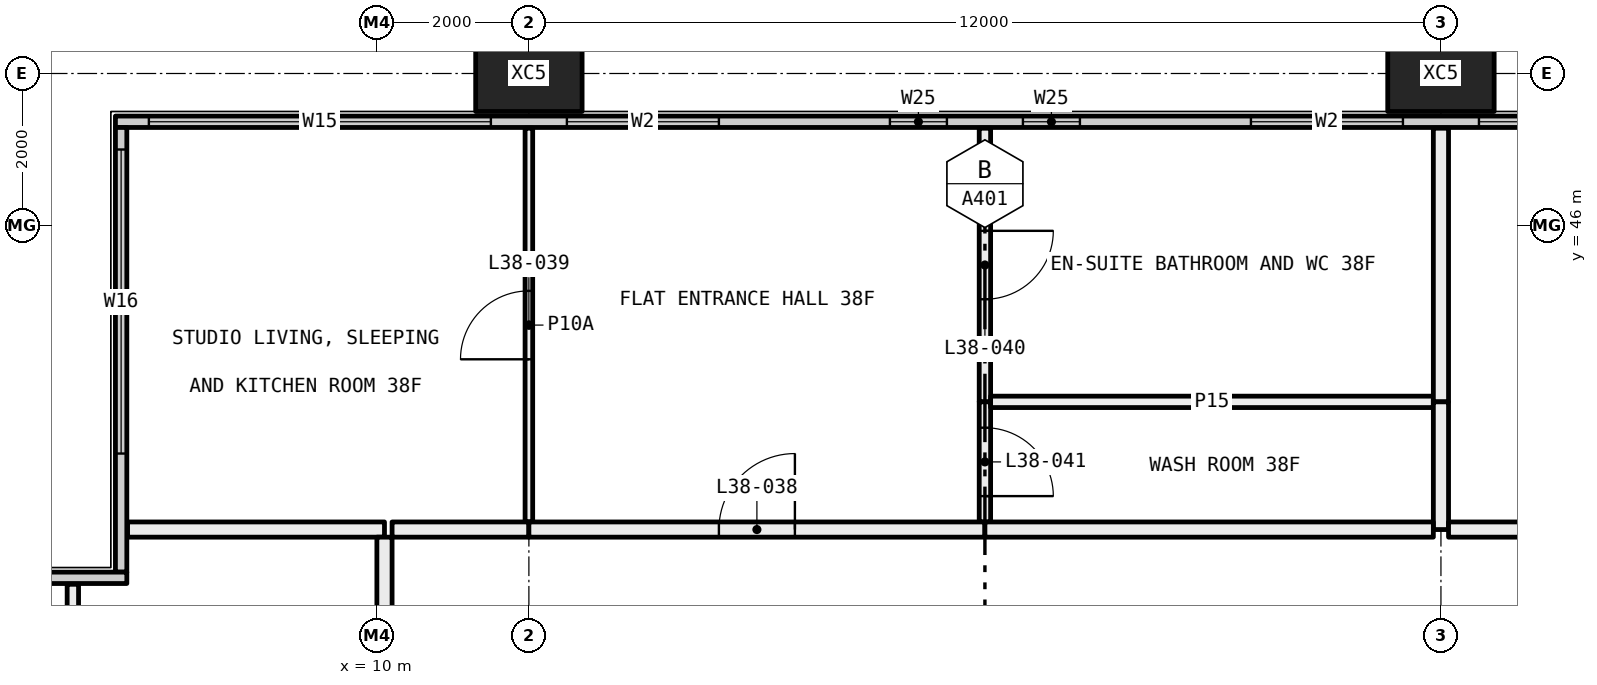
"""IFC4 building model, lengths in metres.
Left out: names, types, materials, properties, quantities, classifications, styles, units other than length and angle.
Written with IfcOpenShell. Run it as: python <this file> out.ifc"""

import sys

from ifc_helpers import new_model, si_unit, direction, frame, frame_2d, origin, origin_2d, place, context, subcontext, project, spatial, rectangle, hollow_rectangle, extrude, element, fill, save


model = new_model("IFC4")
c1 = context("Model", 3, precision=1e-05, world=origin(), true_north=direction((0.0, 1.0)))
c2 = subcontext(c1, "Body", "Model", "MODEL_VIEW")
j1 = project(units=[si_unit("LENGTHUNIT", "METRE"), si_unit("PLANEANGLEUNIT", "RADIAN")], contexts=[c1])
p1 = place(None, origin())
s1 = spatial("IfcSite", under=j1, at=p1, CompositionType="ELEMENT")
p2 = place(p1, origin())
s2 = spatial("IfcBuilding", under=s1, at=p2, CompositionType="ELEMENT")
p3 = place(p2, frame((0.0, 0.0, 144.9)))
s3 = spatial("IfcBuildingStorey", under=s2, at=p3, CompositionType="ELEMENT", Elevation=144.9)
for number, where, z_axis, x_axis in (
    (1, (12.0, 48.0, -0.4), (0.0, 0.0, 1.0), (1.0, 0.0, 0.0)),
    (2, (24.0, 48.0, -0.4), (0.0, 0.0, 1.0), (1.0, 0.0, 0.0)),
):
    element("IfcColumn", number, at=place(p3, frame(where, z_axis=z_axis, x_axis=x_axis)), inside=s3, PredefinedType="COLUMN", context=c2, shape_type="SweptSolid", body=[
        extrude(hollow_rectangle(XDim=1.4, YDim=1.0, WallThickness=0.055, at=origin_2d()), origin(), (0.0, 0.0, 1.0), 3.45),
    ])
p4 = place(p3, frame((6.56, 47.365, 0.0), z_axis=(0.0, 0.0, 1.0), x_axis=(1.0, 0.0, 0.0)))
e3 = element("IfcWall", 3, at=p4, inside=s3, PredefinedType="ELEMENTEDWALL", context=c2, shape_type="SweptSolid", body=[
    extrude(rectangle(XDim=58.88, YDim=0.15, at=frame_2d((29.44, 0.0))), origin(), (0.0, 0.0, 1.0), 3.05),
])
p5 = place(p4, frame((0.44, 0.0, 0.45)))
e4 = element("IfcOpeningElement", 4, at=p5, cuts=e3, PredefinedType="OPENING", context=c2, shape_type="SweptSolid", body=[
    extrude(rectangle(XDim=4.5, YDim=2.55, at=frame_2d((2.25, 1.275))), frame((0.0, 0.085, 0.0), z_axis=(0.0, -1.0, 0.0), x_axis=(1.0, 0.0, 0.0)), (0.0, 0.0, 1.0), 0.17),
])
p6 = place(p4, frame((5.94, 0.0, 0.45)))
e5 = element("IfcOpeningElement", 5, at=p6, cuts=e3, PredefinedType="OPENING", context=c2, shape_type="SweptSolid", body=[
    extrude(rectangle(XDim=2.0, YDim=2.55, at=frame_2d((1.0, 1.275))), frame((0.0, 0.085, 0.0), z_axis=(0.0, -1.0, 0.0), x_axis=(1.0, 0.0, 0.0)), (0.0, 0.0, 1.0), 0.17),
])
p7 = place(p4, frame((10.19, 0.0, 0.45)))
e6 = element("IfcOpeningElement", 6, at=p7, cuts=e3, PredefinedType="OPENING", context=c2, shape_type="SweptSolid", body=[
    extrude(rectangle(XDim=0.75, YDim=2.55, at=frame_2d((0.375, 1.275))), frame((0.0, 0.085, 0.0), z_axis=(0.0, -1.0, 0.0), x_axis=(1.0, 0.0, 0.0)), (0.0, 0.0, 1.0), 0.17),
])
p8 = place(p4, frame((11.94, 0.0, 0.45)))
e7 = element("IfcOpeningElement", 7, at=p8, cuts=e3, PredefinedType="OPENING", context=c2, shape_type="SweptSolid", body=[
    extrude(rectangle(XDim=0.75, YDim=2.55, at=frame_2d((0.375, 1.275))), frame((0.0, 0.085, 0.0), z_axis=(0.0, -1.0, 0.0), x_axis=(1.0, 0.0, 0.0)), (0.0, 0.0, 1.0), 0.17),
])
p9 = place(p4, frame((14.94, 0.0, 0.45)))
e8 = element("IfcOpeningElement", 8, at=p9, cuts=e3, PredefinedType="OPENING", context=c2, shape_type="SweptSolid", body=[
    extrude(rectangle(XDim=2.0, YDim=2.55, at=frame_2d((1.0, 1.275))), frame((0.0, 0.085, 0.0), z_axis=(0.0, -1.0, 0.0), x_axis=(1.0, 0.0, 0.0)), (0.0, 0.0, 1.0), 0.17),
])
p10 = place(p4, frame((17.94, 0.0, 0.45)))
e9 = element("IfcOpeningElement", 9, at=p10, cuts=e3, PredefinedType="OPENING", context=c2, shape_type="SweptSolid", body=[
    extrude(rectangle(XDim=2.0, YDim=2.55, at=frame_2d((1.0, 1.275))), frame((0.0, 0.085, 0.0), z_axis=(0.0, -1.0, 0.0), x_axis=(1.0, 0.0, 0.0)), (0.0, 0.0, 1.0), 0.17),
])
p11 = place(p4, frame((22.19, 0.0, 0.45)))
e10 = element("IfcOpeningElement", 10, at=p11, cuts=e3, PredefinedType="OPENING", context=c2, shape_type="SweptSolid", body=[
    extrude(rectangle(XDim=0.75, YDim=2.55, at=frame_2d((0.375, 1.275))), frame((0.0, 0.085, 0.0), z_axis=(0.0, -1.0, 0.0), x_axis=(1.0, 0.0, 0.0)), (0.0, 0.0, 1.0), 0.17),
])
p12 = place(p4, frame((23.94, 0.0, 0.45)))
e11 = element("IfcOpeningElement", 11, at=p12, cuts=e3, PredefinedType="OPENING", context=c2, shape_type="SweptSolid", body=[
    extrude(rectangle(XDim=0.75, YDim=2.55, at=frame_2d((0.375, 1.275))), frame((0.0, 0.085, 0.0), z_axis=(0.0, -1.0, 0.0), x_axis=(1.0, 0.0, 0.0)), (0.0, 0.0, 1.0), 0.17),
])
p13 = place(p4, frame((26.94, 0.0, 0.45)))
e12 = element("IfcOpeningElement", 12, at=p13, cuts=e3, PredefinedType="OPENING", context=c2, shape_type="SweptSolid", body=[
    extrude(rectangle(XDim=2.0, YDim=2.55, at=frame_2d((1.0, 1.275))), frame((0.0, 0.085, 0.0), z_axis=(0.0, -1.0, 0.0), x_axis=(1.0, 0.0, 0.0)), (0.0, 0.0, 1.0), 0.17),
])
p14 = place(p4, frame((29.94, 0.0, 0.45)))
e13 = element("IfcOpeningElement", 13, at=p14, cuts=e3, PredefinedType="OPENING", context=c2, shape_type="SweptSolid", body=[
    extrude(rectangle(XDim=2.0, YDim=2.55, at=frame_2d((1.0, 1.275))), frame((0.0, 0.085, 0.0), z_axis=(0.0, -1.0, 0.0), x_axis=(1.0, 0.0, 0.0)), (0.0, 0.0, 1.0), 0.17),
])
p15 = place(p4, frame((34.19, 0.0, 0.45)))
e14 = element("IfcOpeningElement", 14, at=p15, cuts=e3, PredefinedType="OPENING", context=c2, shape_type="SweptSolid", body=[
    extrude(rectangle(XDim=0.75, YDim=2.55, at=frame_2d((0.375, 1.275))), frame((0.0, 0.085, 0.0), z_axis=(0.0, -1.0, 0.0), x_axis=(1.0, 0.0, 0.0)), (0.0, 0.0, 1.0), 0.17),
])
p16 = place(p4, frame((35.94, 0.0, 0.45)))
e15 = element("IfcOpeningElement", 15, at=p16, cuts=e3, PredefinedType="OPENING", context=c2, shape_type="SweptSolid", body=[
    extrude(rectangle(XDim=0.75, YDim=2.55, at=frame_2d((0.375, 1.275))), frame((0.0, 0.085, 0.0), z_axis=(0.0, -1.0, 0.0), x_axis=(1.0, 0.0, 0.0)), (0.0, 0.0, 1.0), 0.17),
])
p17 = place(p4, frame((38.94, 0.0, 0.45)))
e16 = element("IfcOpeningElement", 16, at=p17, cuts=e3, PredefinedType="OPENING", context=c2, shape_type="SweptSolid", body=[
    extrude(rectangle(XDim=2.0, YDim=2.55, at=frame_2d((1.0, 1.275))), frame((0.0, 0.085, 0.0), z_axis=(0.0, -1.0, 0.0), x_axis=(1.0, 0.0, 0.0)), (0.0, 0.0, 1.0), 0.17),
])
p18 = place(p4, frame((41.94, 0.0, 0.45)))
e17 = element("IfcOpeningElement", 17, at=p18, cuts=e3, PredefinedType="OPENING", context=c2, shape_type="SweptSolid", body=[
    extrude(rectangle(XDim=2.0, YDim=2.55, at=frame_2d((1.0, 1.275))), frame((0.0, 0.085, 0.0), z_axis=(0.0, -1.0, 0.0), x_axis=(1.0, 0.0, 0.0)), (0.0, 0.0, 1.0), 0.17),
])
p19 = place(p4, frame((46.19, 0.0, 0.45)))
e18 = element("IfcOpeningElement", 18, at=p19, cuts=e3, PredefinedType="OPENING", context=c2, shape_type="SweptSolid", body=[
    extrude(rectangle(XDim=0.75, YDim=2.55, at=frame_2d((0.375, 1.275))), frame((0.0, 0.085, 0.0), z_axis=(0.0, -1.0, 0.0), x_axis=(1.0, 0.0, 0.0)), (0.0, 0.0, 1.0), 0.17),
])
p20 = place(p4, frame((47.94, 0.0, 0.45)))
e19 = element("IfcOpeningElement", 19, at=p20, cuts=e3, PredefinedType="OPENING", context=c2, shape_type="SweptSolid", body=[
    extrude(rectangle(XDim=0.75, YDim=2.55, at=frame_2d((0.375, 1.275))), frame((0.0, 0.085, 0.0), z_axis=(0.0, -1.0, 0.0), x_axis=(1.0, 0.0, 0.0)), (0.0, 0.0, 1.0), 0.17),
])
p21 = place(p4, frame((50.94, 0.0, 0.45)))
e20 = element("IfcOpeningElement", 20, at=p21, cuts=e3, PredefinedType="OPENING", context=c2, shape_type="SweptSolid", body=[
    extrude(rectangle(XDim=2.0, YDim=2.55, at=frame_2d((1.0, 1.275))), frame((0.0, 0.085, 0.0), z_axis=(0.0, -1.0, 0.0), x_axis=(1.0, 0.0, 0.0)), (0.0, 0.0, 1.0), 0.17),
])
p22 = place(p4, frame((53.94, 0.0, 0.45)))
e21 = element("IfcOpeningElement", 21, at=p22, cuts=e3, PredefinedType="OPENING", context=c2, shape_type="SweptSolid", body=[
    extrude(rectangle(XDim=4.5, YDim=2.55, at=frame_2d((2.25, 1.275))), frame((0.0, 0.085, 0.0), z_axis=(0.0, -1.0, 0.0), x_axis=(1.0, 0.0, 0.0)), (0.0, 0.0, 1.0), 0.17),
])
p23 = place(p3, frame((6.635, 41.44, 0.0), z_axis=(0.0, 0.0, 1.0), x_axis=(0.0, 1.0, 0.0)))
e22 = element("IfcWall", 22, at=p23, inside=s3, PredefinedType="ELEMENTEDWALL", context=c2, shape_type="SweptSolid", body=[
    extrude(rectangle(XDim=5.85, YDim=0.15, at=frame_2d((2.925, 0.0))), origin(), (0.0, 0.0, 1.0), 3.05),
])
p24 = place(p23, frame((1.56, 0.0, 0.45)))
e23 = element("IfcOpeningElement", 23, at=p24, cuts=e22, PredefinedType="OPENING", context=c2, shape_type="SweptSolid", body=[
    extrude(rectangle(XDim=4.0, YDim=2.55, at=frame_2d((2.0, 1.275))), frame((0.0, 0.085, 0.0), z_axis=(0.0, -1.0, 0.0), x_axis=(1.0, 0.0, 0.0)), (0.0, 0.0, 1.0), 0.17),
])
p25 = place(p3, frame((0.56, 41.365, 0.0), z_axis=(0.0, 0.0, 1.0), x_axis=(1.0, 0.0, 0.0)))
e24 = element("IfcWall", 24, at=p25, inside=s3, PredefinedType="ELEMENTEDWALL", context=c2, shape_type="SweptSolid", body=[
    extrude(rectangle(XDim=6.15, YDim=0.15, at=frame_2d((3.075, 0.0))), origin(), (0.0, 0.0, 1.0), 3.05),
])
p26 = place(p25, frame((0.44, 0.0, 0.45)))
e25 = element("IfcOpeningElement", 25, at=p26, cuts=e24, PredefinedType="OPENING", context=c2, shape_type="SweptSolid", body=[
    extrude(rectangle(XDim=4.0, YDim=2.55, at=frame_2d((2.0, 1.275))), frame((0.0, 0.085, 0.0), z_axis=(0.0, -1.0, 0.0), x_axis=(1.0, 0.0, 0.0)), (0.0, 0.0, 1.0), 0.17),
])
p27 = place(p3, frame((6.0, 37.5, 0.0), z_axis=(0.0, 0.0, 1.0), x_axis=(0.0, 1.0, 0.0)))
e26 = element("IfcWall", 26, at=p27, inside=s3, PredefinedType="PARTITIONING", context=c2, shape_type="SweptSolid", body=[
    extrude(rectangle(XDim=3.78, YDim=0.15, at=frame_2d((1.89, 0.0))), origin(), (0.0, 0.0, 1.0), 3.05),
])
p28 = place(p3, frame((10.1, 42.0, 0.0), z_axis=(0.0, 0.0, 1.0), x_axis=(-1.0, 0.0, 0.0)))
e27 = element("IfcWall", 27, at=p28, inside=s3, PredefinedType="PARTITIONING", context=c2, shape_type="SweptSolid", body=[
    extrude(rectangle(XDim=3.38, YDim=0.2, at=frame_2d((1.69, 0.0))), origin(), (0.0, 0.0, 1.0), 3.05),
])
p29 = place(p3, frame((10.1, 37.5, 0.0), z_axis=(0.0, 0.0, 1.0), x_axis=(0.0, 1.0, 0.0)))
e28 = element("IfcWall", 28, at=p29, inside=s3, PredefinedType="PARTITIONING", context=c2, shape_type="SweptSolid", body=[
    extrude(rectangle(XDim=4.4, YDim=0.2, at=frame_2d((2.2, 0.0))), origin(), (0.0, 0.0, 1.0), 3.05),
])
p30 = place(p3, frame((12.0, 42.1, 0.0), z_axis=(0.0, 0.0, 1.0), x_axis=(0.0, 1.0, 0.0)))
e29 = element("IfcWall", 29, at=p30, inside=s3, PredefinedType="PARTITIONING", context=c2, shape_type="SweptSolid", body=[
    extrude(rectangle(XDim=5.18, YDim=0.1, at=frame_2d((2.59, 0.0))), origin(), (0.0, 0.0, 1.0), 3.05),
])
p31 = place(p30, frame((2.14, 0.0, 0.0)))
e30 = element("IfcOpeningElement", 30, at=p31, cuts=e29, PredefinedType="OPENING", context=c2, shape_type="SweptSolid", body=[
    extrude(rectangle(XDim=0.9, YDim=2.1, at=frame_2d((0.45, 1.05))), frame((0.0, 0.06, 0.0), z_axis=(0.0, -1.0, 0.0), x_axis=(1.0, 0.0, 0.0)), (0.0, 0.0, 1.0), 0.12),
])
p32 = place(p3, frame((10.2, 42.0, 0.0), z_axis=(0.0, 0.0, 1.0), x_axis=(1.0, 0.0, 0.0)))
e31 = element("IfcWall", 31, at=p32, inside=s3, PredefinedType="PARTITIONING", context=c2, shape_type="SweptSolid", body=[
    extrude(rectangle(XDim=1.8, YDim=0.2, at=frame_2d((0.9, 0.0))), origin(), (0.0, 0.0, 1.0), 3.05),
])
p33 = place(p3, frame((18.0, 43.68, 0.0), z_axis=(0.0, 0.0, 1.0), x_axis=(0.0, 1.0, 0.0)))
e32 = element("IfcWall", 32, at=p33, inside=s3, PredefinedType="PARTITIONING", context=c2, shape_type="SweptSolid", body=[
    extrude(rectangle(XDim=3.6, YDim=0.15, at=frame_2d((1.8, 0.0))), origin(), (0.0, 0.0, 1.0), 3.05),
])
p34 = place(p33, frame((1.35, 0.0, 0.0)))
e33 = element("IfcOpeningElement", 33, at=p34, cuts=e32, PredefinedType="OPENING", context=c2, shape_type="SweptSolid", body=[
    extrude(rectangle(XDim=0.9, YDim=2.1, at=frame_2d((0.45, 1.05))), frame((0.0, 0.085, 0.0), z_axis=(0.0, -1.0, 0.0), x_axis=(1.0, 0.0, 0.0)), (0.0, 0.0, 1.0), 0.17),
])
p35 = place(p3, frame((18.0, 42.1, 0.0), z_axis=(0.0, 0.0, 1.0), x_axis=(0.0, 1.0, 0.0)))
e34 = element("IfcWall", 34, at=p35, inside=s3, PredefinedType="PARTITIONING", context=c2, shape_type="SweptSolid", body=[
    extrude(rectangle(XDim=1.58, YDim=0.15, at=frame_2d((0.79, 0.0))), origin(), (0.0, 0.0, 1.0), 3.05),
])
p36 = place(p35, frame((0.34, 0.0, 0.0)))
e35 = element("IfcOpeningElement", 35, at=p36, cuts=e34, PredefinedType="OPENING", context=c2, shape_type="SweptSolid", body=[
    extrude(rectangle(XDim=0.9, YDim=2.1, at=frame_2d((0.45, 1.05))), frame((0.0, 0.085, 0.0), z_axis=(0.0, -1.0, 0.0), x_axis=(1.0, 0.0, 0.0)), (0.0, 0.0, 1.0), 0.17),
])
p37 = place(p3, frame((12.0, 42.0, 0.0), z_axis=(0.0, 0.0, 1.0), x_axis=(1.0, 0.0, 0.0)))
e36 = element("IfcWall", 36, at=p37, inside=s3, PredefinedType="PARTITIONING", context=c2, shape_type="SweptSolid", body=[
    extrude(rectangle(XDim=6.0, YDim=0.2, at=frame_2d((3.0, 0.0))), origin(), (0.0, 0.0, 1.0), 3.05),
])
p38 = place(p37, frame((2.5, 0.0, 0.0)))
e37 = element("IfcOpeningElement", 37, at=p38, cuts=e36, PredefinedType="OPENING", context=c2, shape_type="SweptSolid", body=[
    extrude(rectangle(XDim=1.0, YDim=2.1, at=frame_2d((0.5, 1.05))), frame((0.0, 0.11, 0.0), z_axis=(0.0, -1.0, 0.0), x_axis=(1.0, 0.0, 0.0)), (0.0, 0.0, 1.0), 0.22),
])
p39 = place(p3, frame((18.075, 43.68, 0.0), z_axis=(0.0, 0.0, 1.0), x_axis=(1.0, 0.0, 0.0)))
e38 = element("IfcWall", 38, at=p39, inside=s3, PredefinedType="PARTITIONING", context=c2, shape_type="SweptSolid", body=[
    extrude(rectangle(XDim=5.825, YDim=0.15, at=frame_2d((2.913, 0.0))), origin(), (0.0, 0.0, 1.0), 3.05),
])
p40 = place(p3, frame((24.0, 43.68, 0.0), z_axis=(0.0, 0.0, 1.0), x_axis=(0.0, 1.0, 0.0)))
e39 = element("IfcWall", 39, at=p40, inside=s3, PredefinedType="PARTITIONING", context=c2, shape_type="SweptSolid", body=[
    extrude(rectangle(XDim=3.6, YDim=0.2, at=frame_2d((1.8, 0.0))), origin(), (0.0, 0.0, 1.0), 3.05),
])
p41 = place(p3, frame((24.0, 42.0, 0.0), z_axis=(0.0, 0.0, 1.0), x_axis=(0.0, 1.0, 0.0)))
e40 = element("IfcWall", 40, at=p41, inside=s3, PredefinedType="PARTITIONING", context=c2, shape_type="SweptSolid", body=[
    extrude(rectangle(XDim=1.68, YDim=0.2, at=frame_2d((0.84, 0.0))), origin(), (0.0, 0.0, 1.0), 3.05),
])
p42 = place(p3, frame((18.0, 42.0, 0.0), z_axis=(0.0, 0.0, 1.0), x_axis=(1.0, 0.0, 0.0)))
e41 = element("IfcWall", 41, at=p42, inside=s3, PredefinedType="PARTITIONING", context=c2, shape_type="SweptSolid", body=[
    extrude(rectangle(XDim=5.9, YDim=0.2, at=frame_2d((2.95, 0.0))), origin(), (0.0, 0.0, 1.0), 3.05),
])
p43 = place(p3, frame((24.1, 42.0, 0.0), z_axis=(0.0, 0.0, 1.0), x_axis=(1.0, 0.0, 0.0)))
e42 = element("IfcWall", 42, at=p43, inside=s3, PredefinedType="PARTITIONING", context=c2, shape_type="SweptSolid", body=[
    extrude(rectangle(XDim=1.8, YDim=0.2, at=frame_2d((0.9, 0.0))), origin(), (0.0, 0.0, 1.0), 3.05),
])
p44 = place(p5, origin())
e43 = element("IfcWindow", 43, at=p44, inside=s3, PartitioningType="SINGLE_PANEL", PredefinedType="WINDOW", context=c2, shape_type="SweptSolid", body=[
    extrude(rectangle(XDim=4.5, YDim=2.55, at=frame_2d((2.25, 1.275))), frame((0.0, 0.03, 0.0), z_axis=(0.0, -1.0, 0.0), x_axis=(1.0, 0.0, 0.0)), (0.0, 0.0, 1.0), 0.06),
])
fill(e4, e43)
p45 = place(p6, origin())
e44 = element("IfcWindow", 44, at=p45, inside=s3, PartitioningType="SINGLE_PANEL", PredefinedType="WINDOW", context=c2, shape_type="SweptSolid", body=[
    extrude(rectangle(XDim=2.0, YDim=2.55, at=frame_2d((1.0, 1.275))), frame((0.0, 0.03, 0.0), z_axis=(0.0, -1.0, 0.0), x_axis=(1.0, 0.0, 0.0)), (0.0, 0.0, 1.0), 0.06),
])
fill(e5, e44)
p46 = place(p7, origin())
e45 = element("IfcWindow", 45, at=p46, inside=s3, PartitioningType="SINGLE_PANEL", PredefinedType="WINDOW", context=c2, shape_type="SweptSolid", body=[
    extrude(rectangle(XDim=0.75, YDim=2.55, at=frame_2d((0.375, 1.275))), frame((0.0, 0.03, 0.0), z_axis=(0.0, -1.0, 0.0), x_axis=(1.0, 0.0, 0.0)), (0.0, 0.0, 1.0), 0.06),
])
fill(e6, e45)
p47 = place(p8, origin())
e46 = element("IfcWindow", 46, at=p47, inside=s3, PartitioningType="SINGLE_PANEL", PredefinedType="WINDOW", context=c2, shape_type="SweptSolid", body=[
    extrude(rectangle(XDim=0.75, YDim=2.55, at=frame_2d((0.375, 1.275))), frame((0.0, 0.03, 0.0), z_axis=(0.0, -1.0, 0.0), x_axis=(1.0, 0.0, 0.0)), (0.0, 0.0, 1.0), 0.06),
])
fill(e7, e46)
p48 = place(p9, origin())
e47 = element("IfcWindow", 47, at=p48, inside=s3, PartitioningType="SINGLE_PANEL", PredefinedType="WINDOW", context=c2, shape_type="SweptSolid", body=[
    extrude(rectangle(XDim=2.0, YDim=2.55, at=frame_2d((1.0, 1.275))), frame((0.0, 0.03, 0.0), z_axis=(0.0, -1.0, 0.0), x_axis=(1.0, 0.0, 0.0)), (0.0, 0.0, 1.0), 0.06),
])
fill(e8, e47)
p49 = place(p10, origin())
e48 = element("IfcWindow", 48, at=p49, inside=s3, PartitioningType="SINGLE_PANEL", PredefinedType="WINDOW", context=c2, shape_type="SweptSolid", body=[
    extrude(rectangle(XDim=2.0, YDim=2.55, at=frame_2d((1.0, 1.275))), frame((0.0, 0.03, 0.0), z_axis=(0.0, -1.0, 0.0), x_axis=(1.0, 0.0, 0.0)), (0.0, 0.0, 1.0), 0.06),
])
fill(e9, e48)
p50 = place(p24, origin())
e49 = element("IfcWindow", 49, at=p50, inside=s3, PartitioningType="SINGLE_PANEL", PredefinedType="WINDOW", context=c2, shape_type="SweptSolid", body=[
    extrude(rectangle(XDim=4.0, YDim=2.55, at=frame_2d((2.0, 1.275))), frame((0.0, 0.03, 0.0), z_axis=(0.0, -1.0, 0.0), x_axis=(1.0, 0.0, 0.0)), (0.0, 0.0, 1.0), 0.06),
])
fill(e23, e49)
p51 = place(p38, origin())
e50 = element("IfcDoor", 50, at=p51, inside=s3, OperationType="SINGLE_SWING_LEFT", PredefinedType="DOOR", context=c2, shape_type="SweptSolid", body=[
    extrude(rectangle(XDim=1.0, YDim=2.1, at=frame_2d((0.5, 1.05))), frame((0.0, 0.025, 0.0), z_axis=(0.0, -1.0, 0.0), x_axis=(1.0, 0.0, 0.0)), (0.0, 0.0, 1.0), 0.05),
])
fill(e37, e50)
p52 = place(p31, origin())
e51 = element("IfcDoor", 51, at=p52, inside=s3, OperationType="SINGLE_SWING_RIGHT", PredefinedType="DOOR", context=c2, shape_type="SweptSolid", body=[
    extrude(rectangle(XDim=0.9, YDim=2.1, at=frame_2d((0.45, 1.05))), frame((0.0, 0.025, 0.0), z_axis=(0.0, -1.0, 0.0), x_axis=(1.0, 0.0, 0.0)), (0.0, 0.0, 1.0), 0.05),
])
fill(e30, e51)
p53 = place(p34, frame((0.9, 0.0, 0.0), x_axis=(-1.0, 0.0, 0.0)))
e52 = element("IfcDoor", 52, at=p53, inside=s3, OperationType="SINGLE_SWING_RIGHT", PredefinedType="DOOR", context=c2, shape_type="SweptSolid", body=[
    extrude(rectangle(XDim=0.9, YDim=2.1, at=frame_2d((0.45, 1.05))), frame((0.0, 0.025, 0.0), z_axis=(0.0, -1.0, 0.0), x_axis=(1.0, 0.0, 0.0)), (0.0, 0.0, 1.0), 0.05),
])
fill(e33, e52)
p54 = place(p36, frame((0.9, 0.0, 0.0), x_axis=(-1.0, 0.0, 0.0)))
e53 = element("IfcDoor", 53, at=p54, inside=s3, OperationType="SINGLE_SWING_LEFT", PredefinedType="DOOR", context=c2, shape_type="SweptSolid", body=[
    extrude(rectangle(XDim=0.9, YDim=2.1, at=frame_2d((0.45, 1.05))), frame((0.0, 0.025, 0.0), z_axis=(0.0, -1.0, 0.0), x_axis=(1.0, 0.0, 0.0)), (0.0, 0.0, 1.0), 0.05),
])
fill(e35, e53)
save(model, sys.argv[1])
